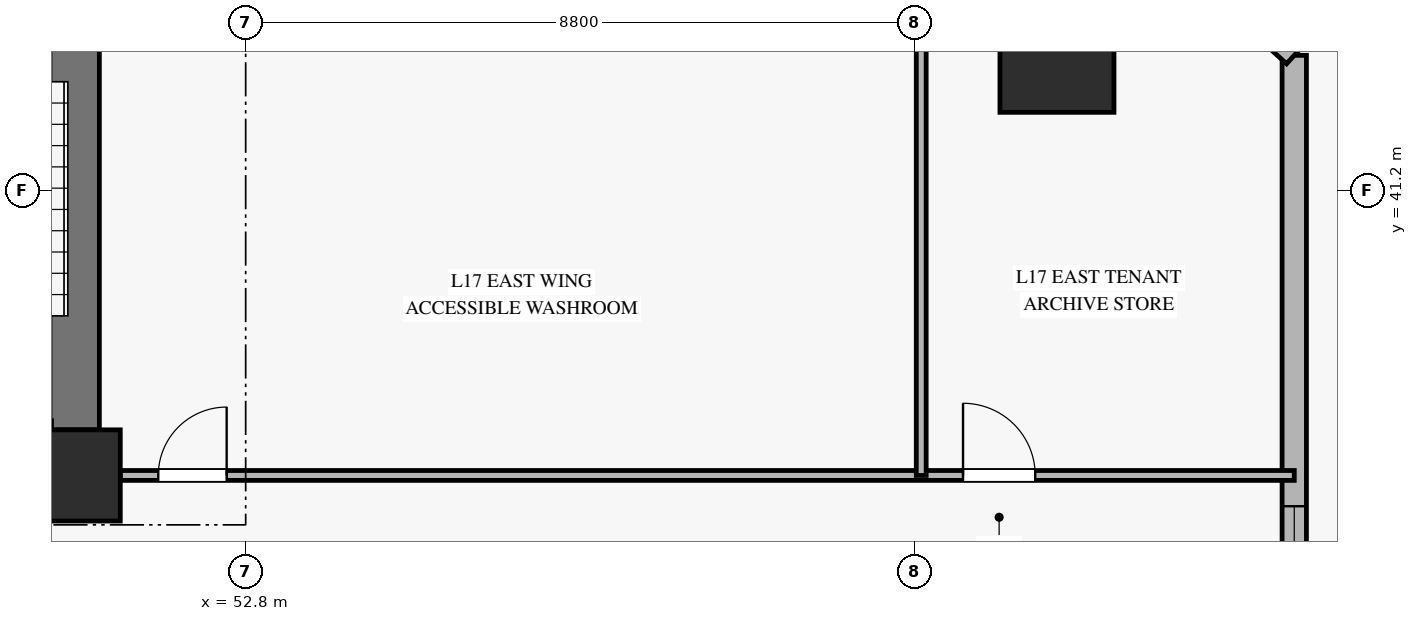
"""IFC4 building model, lengths in metres.
Left out: names, types, materials, properties, quantities, classifications, styles, units other than length and angle.
Written with IfcOpenShell. Run it as: python <this file> out.ifc"""

import sys

from ifc_helpers import new_model, si_unit, direction, frame, frame_2d, origin, origin_2d, place, context, subcontext, project, spatial, rectangle, hollow_rectangle, extrude, source, transform, mapped, element, fill, save


model = new_model("IFC4")
c1 = context("Model", 3, precision=1e-05, world=origin(), true_north=direction((0.0, 1.0)))
c2 = subcontext(c1, "Body", "Model", "MODEL_VIEW")
j1 = project(units=[si_unit("LENGTHUNIT", "METRE"), si_unit("PLANEANGLEUNIT", "RADIAN")], contexts=[c1])
p1 = place(None, origin())
s1 = spatial("IfcSite", under=j1, at=p1, CompositionType="ELEMENT")
p2 = place(p1, origin())
s2 = spatial("IfcBuilding", under=s1, at=p2, CompositionType="ELEMENT")
p3 = place(p2, frame((0.0, 0.0, 68.9)))
s3 = spatial("IfcBuildingStorey", under=s2, at=p3, CompositionType="ELEMENT", Elevation=68.9)
m1 = source(origin(), c2, "Body", "SweptSolid", [
    extrude(rectangle(XDim=1.2, YDim=1.2, at=origin_2d()), origin(), (0.0, 0.0, 1.0), 3.64),
])
p4 = place(p3, frame((50.55, 37.45, 0.0), z_axis=(0.0, 0.0, 1.0), x_axis=(1.0, 0.0, 0.0)))
e1 = element("IfcColumn", 1, at=p4, inside=s3, PredefinedType="PILASTER", context=c2, shape_type="MappedRepresentation", body=[
    mapped(m1, transform((0.0, 0.0, 0.0), x_axis=(1.0, 0.0, 0.0), y_axis=(0.0, 1.0, 0.0), z_axis=(0.0, 0.0, 1.0), scale=1.0)),
])
p5 = place(p3, frame((50.55, 38.05, 0.0), z_axis=(0.0, 0.0, 1.0), x_axis=(0.0, 1.0, 0.0)))
e2 = element("IfcWall", 2, at=p5, inside=s3, PredefinedType="SHEAR", context=c2, shape_type="SweptSolid", body=[
    extrude(rectangle(XDim=7.9, YDim=0.65, at=frame_2d((3.95, 0.0))), origin(), (0.0, 0.0, 1.0), 3.64),
])
m2 = source(origin(), c2, "Body", "SweptSolid", [
    extrude(hollow_rectangle(XDim=1.5, YDim=1.5, WallThickness=0.07, at=origin_2d()), origin(), (0.0, 0.0, 1.0), 3.646),
])
p6 = place(p3, frame((63.474, 42.978, 0.0), z_axis=(-0.057382045214, 0.007097429163, 0.998327064336), x_axis=(-0.122751882683, -0.992437391122, 0.0)))
e3 = element("IfcColumn", 3, at=p6, inside=s3, PredefinedType="COLUMN", context=c2, shape_type="MappedRepresentation", body=[
    mapped(m2, transform((0.0, 0.0, 0.0), x_axis=(1.0, 0.0, 0.0), y_axis=(0.0, 1.0, 0.0), z_axis=(0.0, 0.0, 1.0), scale=1.0)),
])
p7 = place(p3, frame((66.596, 25.991, 0.0), z_axis=(0.0, 0.0, 1.0), x_axis=(0.0, 1.0, 0.0)))
e4 = element("IfcWall", 4, at=p7, inside=s3, PredefinedType="SOLIDWALL", context=c2, shape_type="SweptSolid", body=[
    extrude(rectangle(XDim=16.987, YDim=0.32, at=frame_2d((8.494, 0.0))), origin(), (0.0, 0.0, 1.0), 3.12),
])
p8 = place(p7, frame((8.654, 0.0, 0.45)))
e5 = element("IfcOpeningElement", 5, at=p8, cuts=e4, PredefinedType="OPENING", context=c2, shape_type="SweptSolid", body=[
    extrude(rectangle(XDim=2.4, YDim=2.1, at=frame_2d((1.2, 1.05))), frame((0.0, 0.17, 0.0), z_axis=(0.0, -1.0, 0.0), x_axis=(1.0, 0.0, 0.0)), (0.0, 0.0, 1.0), 0.34),
])
p9 = place(p3, frame((66.596, 42.978, 0.0), z_axis=(0.0, 0.0, 1.0), x_axis=(-0.742036825769, 0.670359119579, 0.0)))
e6 = element("IfcWall", 6, at=p9, inside=s3, PredefinedType="SOLIDWALL", context=c2, shape_type="SweptSolid", body=[
    extrude(rectangle(XDim=4.881, YDim=0.3, at=frame_2d((2.44, 0.0))), origin(), (0.0, 0.0, 1.0), 3.12),
])
p10 = place(p9, frame((1.641, 0.0, 0.45)))
e7 = element("IfcOpeningElement", 7, at=p10, cuts=e6, PredefinedType="OPENING", context=c2, shape_type="SweptSolid", body=[
    extrude(rectangle(XDim=1.6, YDim=2.0, at=frame_2d((0.8, 1.0))), frame((0.0, 0.16, 0.0), z_axis=(0.0, -1.0, 0.0), x_axis=(1.0, 0.0, 0.0)), (0.0, 0.0, 1.0), 0.32),
])
p11 = place(p3, frame((51.15, 37.45, 0.0), z_axis=(0.0, 0.0, 1.0), x_axis=(1.0, 0.0, 0.0)))
e8 = element("IfcWall", 8, at=p11, inside=s3, PredefinedType="PARTITIONING", context=c2, shape_type="SweptSolid", body=[
    extrude(rectangle(XDim=15.446, YDim=0.13, at=frame_2d((7.723, 0.0))), origin(), (0.0, 0.0, 1.0), 3.125),
])
p12 = place(p11, frame((0.5, 0.0, 0.0)))
e9 = element("IfcOpeningElement", 9, at=p12, cuts=e8, PredefinedType="OPENING", context=c2, shape_type="SweptSolid", body=[
    extrude(rectangle(XDim=0.9, YDim=2.1, at=frame_2d((0.45, 1.05))), frame((0.0, 0.075, 0.0), z_axis=(0.0, -1.0, 0.0), x_axis=(1.0, 0.0, 0.0)), (0.0, 0.0, 1.0), 0.15),
])
p13 = place(p11, frame((11.088, 0.0, 0.0)))
e10 = element("IfcOpeningElement", 10, at=p13, cuts=e8, PredefinedType="OPENING", context=c2, shape_type="SweptSolid", body=[
    extrude(rectangle(XDim=0.95, YDim=2.1, at=frame_2d((0.475, 1.05))), frame((0.0, 0.075, 0.0), z_axis=(0.0, -1.0, 0.0), x_axis=(1.0, 0.0, 0.0)), (0.0, 0.0, 1.0), 0.15),
])
p14 = place(p3, frame((61.688, 37.45, 0.0), z_axis=(0.0, 0.0, 1.0), x_axis=(0.0, 1.0, 0.0)))
e11 = element("IfcWall", 11, at=p14, inside=s3, PredefinedType="PARTITIONING", context=c2, shape_type="SweptSolid", body=[
    extrude(rectangle(XDim=8.8, YDim=0.13, at=frame_2d((4.4, 0.0))), origin(), (0.0, 0.0, 1.0), 3.64),
])
m3 = source(origin(), c2, "Body", "SweptSolid", [
    extrude(rectangle(XDim=2.4, YDim=2.1, at=frame_2d((1.2, 1.05))), frame((0.0, 0.03, 0.0), z_axis=(0.0, -1.0, 0.0), x_axis=(1.0, 0.0, 0.0)), (0.0, 0.0, 1.0), 0.06),
])
p15 = place(p8, origin())
e12 = element("IfcWindow", 12, at=p15, inside=s3, PartitioningType="SINGLE_PANEL", PredefinedType="WINDOW", context=c2, shape_type="MappedRepresentation", body=[
    mapped(m3, transform((0.0, 0.0, 0.0), x_axis=(1.0, 0.0, 0.0), y_axis=(0.0, 1.0, 0.0), z_axis=(0.0, 0.0, 1.0), scale=1.0)),
])
fill(e5, e12)
m4 = source(origin(), c2, "Body", "SweptSolid", [
    extrude(rectangle(XDim=0.9, YDim=2.1, at=frame_2d((0.45, 1.05))), frame((0.0, 0.025, 0.0), z_axis=(0.0, -1.0, 0.0), x_axis=(1.0, 0.0, 0.0)), (0.0, 0.0, 1.0), 0.05),
])
p16 = place(p12, origin())
e13 = element("IfcDoor", 13, at=p16, inside=s3, OperationType="SINGLE_SWING_RIGHT", PredefinedType="DOOR", context=c2, shape_type="MappedRepresentation", body=[
    mapped(m4, transform((0.0, 0.0, 0.0), x_axis=(1.0, 0.0, 0.0), y_axis=(0.0, 1.0, 0.0), z_axis=(0.0, 0.0, 1.0), scale=1.0)),
])
fill(e9, e13)
m5 = source(origin(), c2, "Body", "SweptSolid", [
    extrude(rectangle(XDim=0.95, YDim=2.1, at=frame_2d((0.475, 1.05))), frame((0.0, 0.025, 0.0), z_axis=(0.0, -1.0, 0.0), x_axis=(1.0, 0.0, 0.0)), (0.0, 0.0, 1.0), 0.05),
])
p17 = place(p13, origin())
e14 = element("IfcDoor", 14, at=p17, inside=s3, OperationType="SINGLE_SWING_LEFT", PredefinedType="DOOR", context=c2, shape_type="MappedRepresentation", body=[
    mapped(m5, transform((0.0, 0.0, 0.0), x_axis=(1.0, 0.0, 0.0), y_axis=(0.0, 1.0, 0.0), z_axis=(0.0, 0.0, 1.0), scale=1.0)),
])
fill(e10, e14)
save(model, sys.argv[1])
